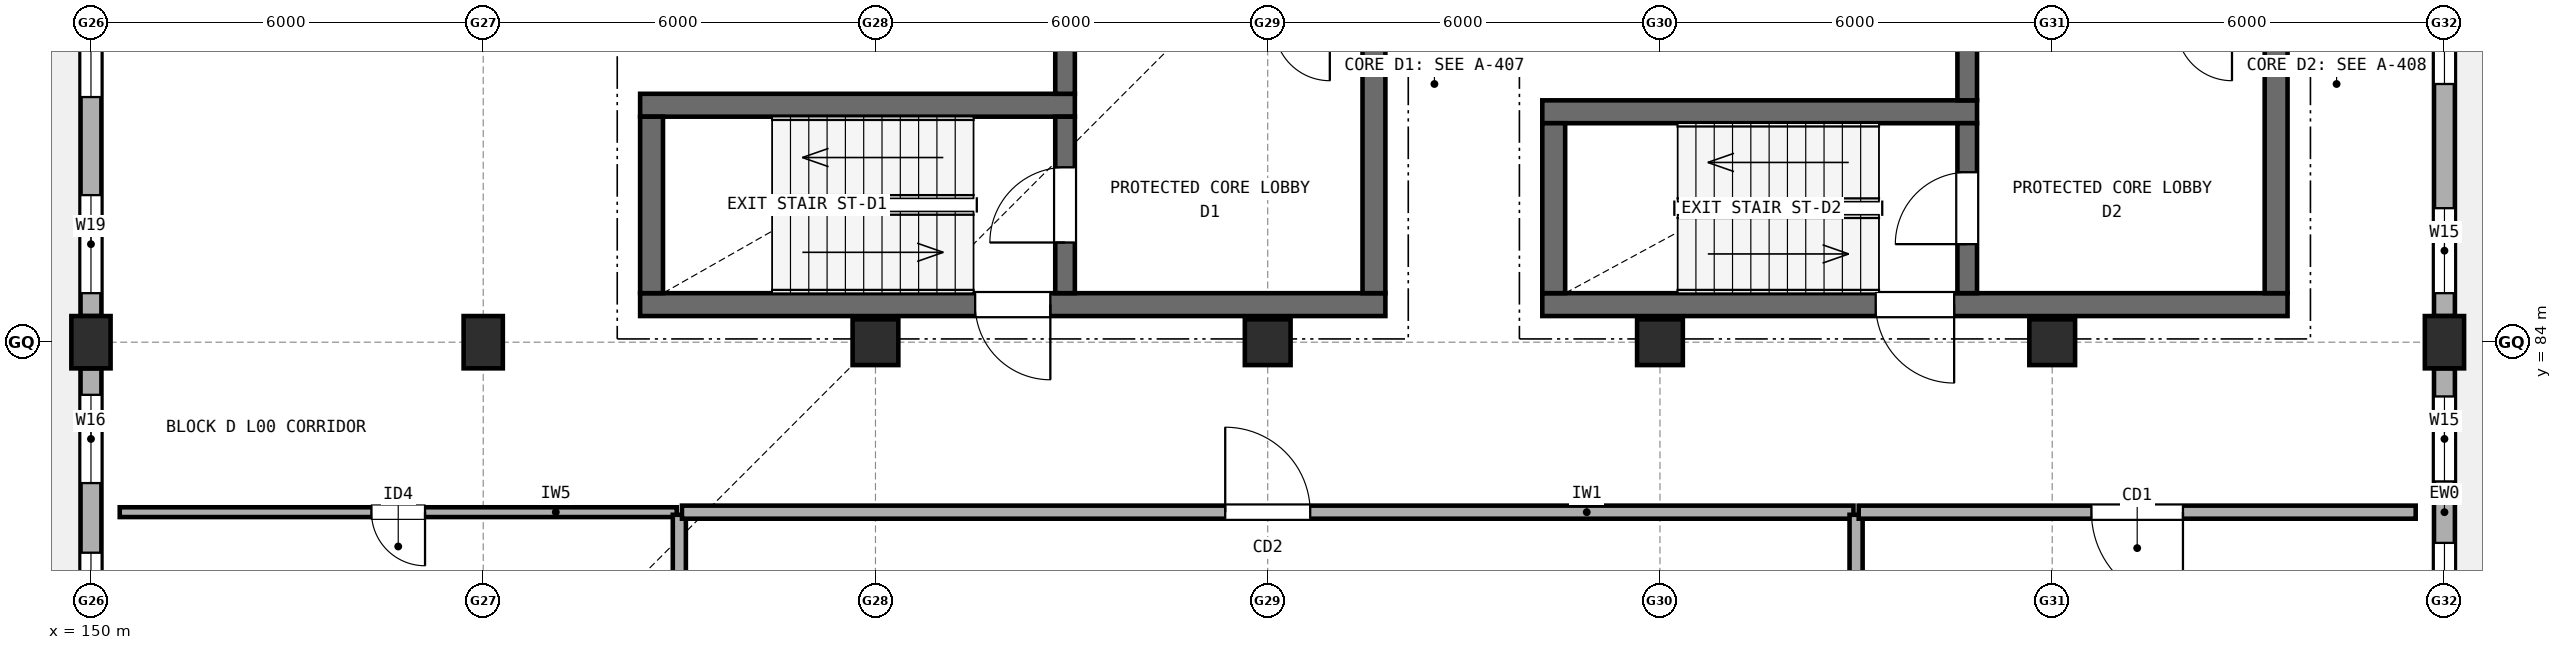
"""IFC4 building model, lengths in metres.
Left out: names, types, materials, properties, quantities, classifications, styles, units other than length and angle.
Written with IfcOpenShell. Run it as: python <this file> out.ifc"""

import sys

from ifc_helpers import new_model, si_unit, direction, frame, frame_2d, origin, origin_2d, place, context, subcontext, project, spatial, rectangle, extrude, element, fill, save


model = new_model("IFC4")
c1 = context("Model", 3, precision=1e-05, world=origin(), true_north=direction((0.0, 1.0)))
c2 = subcontext(c1, "Body", "Model", "MODEL_VIEW")
j1 = project(units=[si_unit("LENGTHUNIT", "METRE"), si_unit("PLANEANGLEUNIT", "RADIAN")], contexts=[c1])
p1 = place(None, origin())
s1 = spatial("IfcSite", under=j1, at=p1, CompositionType="ELEMENT")
p2 = place(p1, origin())
s2 = spatial("IfcBuilding", under=s1, at=p2, CompositionType="ELEMENT")
p3 = place(p2, origin())
s3 = spatial("IfcBuildingStorey", under=s2, at=p3, CompositionType="ELEMENT", Elevation=0.0)
for number, where, z_axis, x_axis in (
    (1, (150.0, 84.0, 0.0), (0.0, 0.0, 1.0), (1.0, 0.0, 0.0)),
    (2, (156.0, 84.0, 0.0), (0.0, 0.0, 1.0), (1.0, 0.0, 0.0)),
):
    element("IfcColumn", number, at=place(p3, frame(where, z_axis=z_axis, x_axis=x_axis)), inside=s3, PredefinedType="COLUMN", context=c2, shape_type="SweptSolid", body=[
        extrude(rectangle(XDim=0.6, YDim=0.8, at=origin_2d()), origin(), (0.0, 0.0, 1.0), 4.23),
    ])
for number, where, z_axis, x_axis in (
    (3, (162.0, 84.0, 0.0), (0.0, 0.0, 1.0), (1.0, 0.0, 0.0)),
    (4, (168.0, 84.0, 0.0), (0.0, 0.0, 1.0), (1.0, 0.0, 0.0)),
    (5, (174.0, 84.0, 0.0), (0.0, 0.0, 1.0), (1.0, 0.0, 0.0)),
    (6, (180.0, 84.0, 0.0), (0.0, 0.0, 1.0), (1.0, 0.0, 0.0)),
):
    element("IfcColumn", number, at=place(p3, frame(where, z_axis=z_axis, x_axis=x_axis)), inside=s3, PredefinedType="COLUMN", context=c2, shape_type="SweptSolid", body=[
        extrude(rectangle(XDim=0.7, YDim=0.7, at=origin_2d()), origin(), (0.0, 0.0, 1.0), 4.23),
    ])
p4 = place(p3, frame((186.0, 84.0, 0.0), z_axis=(0.0, 0.0, 1.0), x_axis=(1.0, 0.0, 0.0)))
e7 = element("IfcColumn", 7, at=p4, inside=s3, PredefinedType="COLUMN", context=c2, shape_type="SweptSolid", body=[
    extrude(rectangle(XDim=0.6, YDim=0.8, at=origin_2d()), origin(), (0.0, 0.0, 1.0), 4.23),
])
p5 = place(p3, frame((186.0, 78.4, 0.0), z_axis=(0.0, 0.0, 1.0), x_axis=(0.0, 1.0, 0.0)))
e8 = element("IfcWall", 8, at=p5, inside=s3, PredefinedType="STANDARD", context=c2, shape_type="SweptSolid", body=[
    extrude(rectangle(XDim=5.2, YDim=0.32, at=frame_2d((2.6, 0.0))), origin(), (0.0, 0.0, 1.0), 3.712),
])
p6 = place(p5, frame((0.43, 0.0, 0.9)))
e9 = element("IfcOpeningElement", 9, at=p6, cuts=e8, PredefinedType="OPENING", context=c2, shape_type="SweptSolid", body=[
    extrude(rectangle(XDim=2.1, YDim=1.55, at=frame_2d((1.05, 0.775))), frame((0.0, 0.17, 0.0), z_axis=(0.0, -1.0, 0.0), x_axis=(1.0, 0.0, 0.0)), (0.0, 0.0, 1.0), 0.34),
])
p7 = place(p5, frame((3.47, 0.0, 0.9)))
e10 = element("IfcOpeningElement", 10, at=p7, cuts=e8, PredefinedType="OPENING", context=c2, shape_type="SweptSolid", body=[
    extrude(rectangle(XDim=1.3, YDim=1.45, at=frame_2d((0.65, 0.725))), frame((0.0, 0.17, 0.0), z_axis=(0.0, -1.0, 0.0), x_axis=(1.0, 0.0, 0.0)), (0.0, 0.0, 1.0), 0.34),
])
p8 = place(p3, frame((186.0, 84.4, 0.0), z_axis=(0.0, 0.0, 1.0), x_axis=(0.0, 1.0, 0.0)))
e11 = element("IfcWall", 11, at=p8, inside=s3, PredefinedType="STANDARD", context=c2, shape_type="SweptSolid", body=[
    extrude(rectangle(XDim=5.2, YDim=0.32, at=frame_2d((2.6, 0.0))), origin(), (0.0, 0.0, 1.0), 3.712),
])
p9 = place(p8, frame((0.35, 0.0, 0.9)))
e12 = element("IfcOpeningElement", 12, at=p9, cuts=e11, PredefinedType="OPENING", context=c2, shape_type="SweptSolid", body=[
    extrude(rectangle(XDim=1.3, YDim=1.45, at=frame_2d((0.65, 0.725))), frame((0.0, 0.17, 0.0), z_axis=(0.0, -1.0, 0.0), x_axis=(1.0, 0.0, 0.0)), (0.0, 0.0, 1.0), 0.34),
])
p10 = place(p8, frame((3.55, 0.0, 0.9)))
e13 = element("IfcOpeningElement", 13, at=p10, cuts=e11, PredefinedType="OPENING", context=c2, shape_type="SweptSolid", body=[
    extrude(rectangle(XDim=1.3, YDim=1.45, at=frame_2d((0.65, 0.725))), frame((0.0, 0.17, 0.0), z_axis=(0.0, -1.0, 0.0), x_axis=(1.0, 0.0, 0.0)), (0.0, 0.0, 1.0), 0.34),
])
p11 = place(p3, frame((150.0, 89.6, 0.0), z_axis=(0.0, 0.0, 1.0), x_axis=(0.0, -1.0, 0.0)))
e14 = element("IfcWall", 14, at=p11, inside=s3, PredefinedType="STANDARD", context=c2, shape_type="SweptSolid", body=[
    extrude(rectangle(XDim=5.2, YDim=0.32, at=frame_2d((2.6, 0.0))), origin(), (0.0, 0.0, 1.0), 3.712),
])
p12 = place(p11, frame((0.35, 0.0, 0.9)))
e15 = element("IfcOpeningElement", 15, at=p12, cuts=e14, PredefinedType="OPENING", context=c2, shape_type="SweptSolid", body=[
    extrude(rectangle(XDim=1.5, YDim=1.5, at=frame_2d((0.75, 0.75))), frame((0.0, 0.17, 0.0), z_axis=(0.0, -1.0, 0.0), x_axis=(1.0, 0.0, 0.0)), (0.0, 0.0, 1.0), 0.34),
])
p13 = place(p11, frame((3.35, 0.0, 0.9)))
e16 = element("IfcOpeningElement", 16, at=p13, cuts=e14, PredefinedType="OPENING", context=c2, shape_type="SweptSolid", body=[
    extrude(rectangle(XDim=1.5, YDim=1.5, at=frame_2d((0.75, 0.75))), frame((0.0, 0.17, 0.0), z_axis=(0.0, -1.0, 0.0), x_axis=(1.0, 0.0, 0.0)), (0.0, 0.0, 1.0), 0.34),
])
p14 = place(p3, frame((150.0, 83.6, 0.0), z_axis=(0.0, 0.0, 1.0), x_axis=(0.0, -1.0, 0.0)))
e17 = element("IfcWall", 17, at=p14, inside=s3, PredefinedType="STANDARD", context=c2, shape_type="SweptSolid", body=[
    extrude(rectangle(XDim=5.2, YDim=0.32, at=frame_2d((2.6, 0.0))), origin(), (0.0, 0.0, 1.0), 3.712),
])
p15 = place(p14, frame((0.405, 0.0, 0.9)))
e18 = element("IfcOpeningElement", 18, at=p15, cuts=e17, PredefinedType="OPENING", context=c2, shape_type="SweptSolid", body=[
    extrude(rectangle(XDim=1.35, YDim=1.5, at=frame_2d((0.675, 0.75))), frame((0.0, 0.17, 0.0), z_axis=(0.0, -1.0, 0.0), x_axis=(1.0, 0.0, 0.0)), (0.0, 0.0, 1.0), 0.34),
])
p16 = place(p14, frame((2.82, 0.0, 0.9)))
e19 = element("IfcOpeningElement", 19, at=p16, cuts=e17, PredefinedType="OPENING", context=c2, shape_type="SweptSolid", body=[
    extrude(rectangle(XDim=1.8, YDim=1.45, at=frame_2d((0.9, 0.725))), frame((0.0, 0.17, 0.0), z_axis=(0.0, -1.0, 0.0), x_axis=(1.0, 0.0, 0.0)), (0.0, 0.0, 1.0), 0.34),
])
p17 = place(p3, frame((158.4, 84.575, 0.0), z_axis=(0.0, 0.0, 1.0), x_axis=(1.0, 0.0, 0.0)))
e20 = element("IfcWall", 20, at=p17, inside=s3, PredefinedType="SHEAR", context=c2, shape_type="SweptSolid", body=[
    extrude(rectangle(XDim=11.4, YDim=0.35, at=frame_2d((5.7, 0.0))), origin(), (0.0, 0.0, 1.0), 4.23),
])
p18 = place(p17, frame((5.125, 0.0, 0.0)))
e21 = element("IfcOpeningElement", 21, at=p18, cuts=e20, PredefinedType="OPENING", context=c2, shape_type="SweptSolid", body=[
    extrude(rectangle(XDim=1.15, YDim=2.15, at=frame_2d((0.575, 1.075))), frame((0.0, 0.185, 0.0), z_axis=(0.0, -1.0, 0.0), x_axis=(1.0, 0.0, 0.0)), (0.0, 0.0, 1.0), 0.37),
])
p19 = place(p3, frame((165.05, 87.625, 0.0), z_axis=(0.0, 0.0, 1.0), x_axis=(-1.0, 0.0, 0.0)))
e22 = element("IfcWall", 22, at=p19, inside=s3, PredefinedType="SHEAR", context=c2, shape_type="SweptSolid", body=[
    extrude(rectangle(XDim=6.65, YDim=0.35, at=frame_2d((3.325, 0.0))), origin(), (0.0, 0.0, 1.0), 4.23),
])
p20 = place(p3, frame((158.575, 87.45, 0.0), z_axis=(0.0, 0.0, 1.0), x_axis=(0.0, -1.0, 0.0)))
e23 = element("IfcWall", 23, at=p20, inside=s3, PredefinedType="SHEAR", context=c2, shape_type="SweptSolid", body=[
    extrude(rectangle(XDim=2.7, YDim=0.35, at=frame_2d((1.35, 0.0))), origin(), (0.0, 0.0, 1.0), 4.23),
])
p21 = place(p3, frame((164.9, 84.75, 0.0), z_axis=(0.0, 0.0, 1.0), x_axis=(0.0, 1.0, 0.0)))
e24 = element("IfcWall", 24, at=p21, inside=s3, PredefinedType="SHEAR", context=c2, shape_type="SweptSolid", body=[
    extrude(rectangle(XDim=2.7, YDim=0.3, at=frame_2d((1.35, 0.0))), origin(), (0.0, 0.0, 1.0), 4.23),
])
p22 = place(p21, frame((0.775, 0.0, 0.0)))
e25 = element("IfcOpeningElement", 25, at=p22, cuts=e24, PredefinedType="OPENING", context=c2, shape_type="SweptSolid", body=[
    extrude(rectangle(XDim=1.15, YDim=2.15, at=frame_2d((0.575, 1.075))), frame((0.0, 0.16, 0.0), z_axis=(0.0, -1.0, 0.0), x_axis=(1.0, 0.0, 0.0)), (0.0, 0.0, 1.0), 0.32),
])
p23 = place(p3, frame((169.625, 84.75, 0.0), z_axis=(0.0, 0.0, 1.0), x_axis=(0.0, 1.0, 0.0)))
e26 = element("IfcWall", 26, at=p23, inside=s3, PredefinedType="SHEAR", context=c2, shape_type="SweptSolid", body=[
    extrude(rectangle(XDim=6.4, YDim=0.35, at=frame_2d((3.2, 0.0))), origin(), (0.0, 0.0, 1.0), 4.23),
])
p24 = place(p3, frame((164.9, 87.8, 0.0), z_axis=(0.0, 0.0, 1.0), x_axis=(0.0, 1.0, 0.0)))
e27 = element("IfcWall", 27, at=p24, inside=s3, PredefinedType="SHEAR", context=c2, shape_type="SweptSolid", body=[
    extrude(rectangle(XDim=3.35, YDim=0.3, at=frame_2d((1.675, 0.0))), origin(), (0.0, 0.0, 1.0), 4.23),
])
p25 = place(p3, frame((172.2, 84.575, 0.0), z_axis=(0.0, 0.0, 1.0), x_axis=(1.0, 0.0, 0.0)))
e28 = element("IfcWall", 28, at=p25, inside=s3, PredefinedType="SHEAR", context=c2, shape_type="SweptSolid", body=[
    extrude(rectangle(XDim=11.4, YDim=0.35, at=frame_2d((5.7, 0.0))), origin(), (0.0, 0.0, 1.0), 4.23),
])
p26 = place(p25, frame((5.1, 0.0, 0.0)))
e29 = element("IfcOpeningElement", 29, at=p26, cuts=e28, PredefinedType="OPENING", context=c2, shape_type="SweptSolid", body=[
    extrude(rectangle(XDim=1.2, YDim=2.15, at=frame_2d((0.6, 1.075))), frame((0.0, 0.185, 0.0), z_axis=(0.0, -1.0, 0.0), x_axis=(1.0, 0.0, 0.0)), (0.0, 0.0, 1.0), 0.37),
])
p27 = place(p3, frame((178.85, 87.525, 0.0), z_axis=(0.0, 0.0, 1.0), x_axis=(-1.0, 0.0, 0.0)))
e30 = element("IfcWall", 30, at=p27, inside=s3, PredefinedType="SHEAR", context=c2, shape_type="SweptSolid", body=[
    extrude(rectangle(XDim=6.65, YDim=0.35, at=frame_2d((3.325, 0.0))), origin(), (0.0, 0.0, 1.0), 4.23),
])
p28 = place(p3, frame((172.375, 87.35, 0.0), z_axis=(0.0, 0.0, 1.0), x_axis=(0.0, -1.0, 0.0)))
e31 = element("IfcWall", 31, at=p28, inside=s3, PredefinedType="SHEAR", context=c2, shape_type="SweptSolid", body=[
    extrude(rectangle(XDim=2.6, YDim=0.35, at=frame_2d((1.3, 0.0))), origin(), (0.0, 0.0, 1.0), 4.23),
])
p29 = place(p3, frame((178.7, 84.75, 0.0), z_axis=(0.0, 0.0, 1.0), x_axis=(0.0, 1.0, 0.0)))
e32 = element("IfcWall", 32, at=p29, inside=s3, PredefinedType="SHEAR", context=c2, shape_type="SweptSolid", body=[
    extrude(rectangle(XDim=2.6, YDim=0.3, at=frame_2d((1.3, 0.0))), origin(), (0.0, 0.0, 1.0), 4.23),
])
p30 = place(p29, frame((0.75, 0.0, 0.0)))
e33 = element("IfcOpeningElement", 33, at=p30, cuts=e32, PredefinedType="OPENING", context=c2, shape_type="SweptSolid", body=[
    extrude(rectangle(XDim=1.1, YDim=2.15, at=frame_2d((0.55, 1.075))), frame((0.0, 0.16, 0.0), z_axis=(0.0, -1.0, 0.0), x_axis=(1.0, 0.0, 0.0)), (0.0, 0.0, 1.0), 0.32),
])
p31 = place(p3, frame((183.425, 84.75, 0.0), z_axis=(0.0, 0.0, 1.0), x_axis=(0.0, 1.0, 0.0)))
e34 = element("IfcWall", 34, at=p31, inside=s3, PredefinedType="SHEAR", context=c2, shape_type="SweptSolid", body=[
    extrude(rectangle(XDim=6.4, YDim=0.35, at=frame_2d((3.2, 0.0))), origin(), (0.0, 0.0, 1.0), 4.23),
])
p32 = place(p3, frame((178.7, 87.7, 0.0), z_axis=(0.0, 0.0, 1.0), x_axis=(0.0, 1.0, 0.0)))
e35 = element("IfcWall", 35, at=p32, inside=s3, PredefinedType="SHEAR", context=c2, shape_type="SweptSolid", body=[
    extrude(rectangle(XDim=3.45, YDim=0.3, at=frame_2d((1.725, 0.0))), origin(), (0.0, 0.0, 1.0), 4.23),
])
p33 = place(p3, frame((150.44, 81.4, 0.0), z_axis=(0.0, 0.0, 1.0), x_axis=(1.0, 0.0, 0.0)))
e36 = element("IfcWall", 36, at=p33, inside=s3, PredefinedType="PARTITIONING", context=c2, shape_type="SweptSolid", body=[
    extrude(rectangle(XDim=8.52, YDim=0.15, at=frame_2d((4.26, 0.0))), origin(), (0.0, 0.0, 1.0), 3.712),
])
p34 = place(p33, frame((3.85, 0.0, 0.0)))
e37 = element("IfcOpeningElement", 37, at=p34, cuts=e36, PredefinedType="OPENING", context=c2, shape_type="SweptSolid", body=[
    extrude(rectangle(XDim=0.82, YDim=2.08, at=frame_2d((0.41, 1.04))), frame((0.0, 0.085, 0.0), z_axis=(0.0, -1.0, 0.0), x_axis=(1.0, 0.0, 0.0)), (0.0, 0.0, 1.0), 0.17),
])
p35 = place(p3, frame((159.0, 72.44, 0.0), z_axis=(0.0, 0.0, 1.0), x_axis=(0.0, 1.0, 0.0)))
e38 = element("IfcWall", 38, at=p35, inside=s3, PredefinedType="SOLIDWALL", context=c2, shape_type="SweptSolid", body=[
    extrude(rectangle(XDim=8.92, YDim=0.2, at=frame_2d((4.46, 0.0))), origin(), (0.0, 0.0, 1.0), 3.112),
])
p36 = place(p3, frame((159.04, 81.4, 0.0), z_axis=(0.0, 0.0, 1.0), x_axis=(1.0, 0.0, 0.0)))
e39 = element("IfcWall", 39, at=p36, inside=s3, PredefinedType="SOLIDWALL", context=c2, shape_type="SweptSolid", body=[
    extrude(rectangle(XDim=17.92, YDim=0.2, at=frame_2d((8.96, 0.0))), origin(), (0.0, 0.0, 1.0), 3.612),
])
p37 = place(p36, frame((8.31, 0.0, 0.0)))
e40 = element("IfcOpeningElement", 40, at=p37, cuts=e39, PredefinedType="OPENING", context=c2, shape_type="SweptSolid", body=[
    extrude(rectangle(XDim=1.3, YDim=2.15, at=frame_2d((0.65, 1.075))), frame((0.0, 0.11, 0.0), z_axis=(0.0, -1.0, 0.0), x_axis=(1.0, 0.0, 0.0)), (0.0, 0.0, 1.0), 0.22),
])
p38 = place(p3, frame((177.0, 72.44, 0.0), z_axis=(0.0, 0.0, 1.0), x_axis=(0.0, 1.0, 0.0)))
e41 = element("IfcWall", 41, at=p38, inside=s3, PredefinedType="SOLIDWALL", context=c2, shape_type="SweptSolid", body=[
    extrude(rectangle(XDim=8.92, YDim=0.2, at=frame_2d((4.46, 0.0))), origin(), (0.0, 0.0, 1.0), 3.112),
])
p39 = place(p3, frame((177.04, 81.4, 0.0), z_axis=(0.0, 0.0, 1.0), x_axis=(1.0, 0.0, 0.0)))
e42 = element("IfcWall", 42, at=p39, inside=s3, PredefinedType="SOLIDWALL", context=c2, shape_type="SweptSolid", body=[
    extrude(rectangle(XDim=8.52, YDim=0.2, at=frame_2d((4.26, 0.0))), origin(), (0.0, 0.0, 1.0), 3.612),
])
p40 = place(p39, frame((3.56, 0.0, 0.0)))
e43 = element("IfcOpeningElement", 43, at=p40, cuts=e42, PredefinedType="OPENING", context=c2, shape_type="SweptSolid", body=[
    extrude(rectangle(XDim=1.4, YDim=2.15, at=frame_2d((0.7, 1.075))), frame((0.0, 0.11, 0.0), z_axis=(0.0, -1.0, 0.0), x_axis=(1.0, 0.0, 0.0)), (0.0, 0.0, 1.0), 0.22),
])
p41 = place(p6, origin())
e44 = element("IfcWindow", 44, at=p41, inside=s3, PartitioningType="SINGLE_PANEL", PredefinedType="WINDOW", context=c2, shape_type="SweptSolid", body=[
    extrude(rectangle(XDim=2.1, YDim=1.55, at=frame_2d((1.05, 0.775))), frame((0.0, 0.03, 0.0), z_axis=(0.0, -1.0, 0.0), x_axis=(1.0, 0.0, 0.0)), (0.0, 0.0, 1.0), 0.06),
])
fill(e9, e44)
p42 = place(p7, origin())
e45 = element("IfcWindow", 45, at=p42, inside=s3, PartitioningType="SINGLE_PANEL", PredefinedType="WINDOW", context=c2, shape_type="SweptSolid", body=[
    extrude(rectangle(XDim=1.3, YDim=1.45, at=frame_2d((0.65, 0.725))), frame((0.0, 0.03, 0.0), z_axis=(0.0, -1.0, 0.0), x_axis=(1.0, 0.0, 0.0)), (0.0, 0.0, 1.0), 0.06),
])
fill(e10, e45)
p43 = place(p9, origin())
e46 = element("IfcWindow", 46, at=p43, inside=s3, PartitioningType="SINGLE_PANEL", PredefinedType="WINDOW", context=c2, shape_type="SweptSolid", body=[
    extrude(rectangle(XDim=1.3, YDim=1.45, at=frame_2d((0.65, 0.725))), frame((0.0, 0.03, 0.0), z_axis=(0.0, -1.0, 0.0), x_axis=(1.0, 0.0, 0.0)), (0.0, 0.0, 1.0), 0.06),
])
fill(e12, e46)
p44 = place(p10, origin())
e47 = element("IfcWindow", 47, at=p44, inside=s3, PartitioningType="SINGLE_PANEL", PredefinedType="WINDOW", context=c2, shape_type="SweptSolid", body=[
    extrude(rectangle(XDim=1.3, YDim=1.45, at=frame_2d((0.65, 0.725))), frame((0.0, 0.03, 0.0), z_axis=(0.0, -1.0, 0.0), x_axis=(1.0, 0.0, 0.0)), (0.0, 0.0, 1.0), 0.06),
])
fill(e13, e47)
p45 = place(p12, origin())
e48 = element("IfcWindow", 48, at=p45, inside=s3, PartitioningType="SINGLE_PANEL", PredefinedType="WINDOW", context=c2, shape_type="SweptSolid", body=[
    extrude(rectangle(XDim=1.5, YDim=1.5, at=frame_2d((0.75, 0.75))), frame((0.0, 0.03, 0.0), z_axis=(0.0, -1.0, 0.0), x_axis=(1.0, 0.0, 0.0)), (0.0, 0.0, 1.0), 0.06),
])
fill(e15, e48)
p46 = place(p13, origin())
e49 = element("IfcWindow", 49, at=p46, inside=s3, PartitioningType="SINGLE_PANEL", PredefinedType="WINDOW", context=c2, shape_type="SweptSolid", body=[
    extrude(rectangle(XDim=1.5, YDim=1.5, at=frame_2d((0.75, 0.75))), frame((0.0, 0.03, 0.0), z_axis=(0.0, -1.0, 0.0), x_axis=(1.0, 0.0, 0.0)), (0.0, 0.0, 1.0), 0.06),
])
fill(e16, e49)
p47 = place(p15, origin())
e50 = element("IfcWindow", 50, at=p47, inside=s3, PartitioningType="SINGLE_PANEL", PredefinedType="WINDOW", context=c2, shape_type="SweptSolid", body=[
    extrude(rectangle(XDim=1.35, YDim=1.5, at=frame_2d((0.675, 0.75))), frame((0.0, 0.03, 0.0), z_axis=(0.0, -1.0, 0.0), x_axis=(1.0, 0.0, 0.0)), (0.0, 0.0, 1.0), 0.06),
])
fill(e18, e50)
p48 = place(p16, origin())
e51 = element("IfcWindow", 51, at=p48, inside=s3, PartitioningType="SINGLE_PANEL", PredefinedType="WINDOW", context=c2, shape_type="SweptSolid", body=[
    extrude(rectangle(XDim=1.8, YDim=1.45, at=frame_2d((0.9, 0.725))), frame((0.0, 0.03, 0.0), z_axis=(0.0, -1.0, 0.0), x_axis=(1.0, 0.0, 0.0)), (0.0, 0.0, 1.0), 0.06),
])
fill(e19, e51)
p49 = place(p18, origin())
e52 = element("IfcDoor", 52, at=p49, inside=s3, OperationType="SINGLE_SWING_RIGHT", PredefinedType="DOOR", context=c2, shape_type="SweptSolid", body=[
    extrude(rectangle(XDim=1.15, YDim=2.15, at=frame_2d((0.575, 1.075))), frame((0.0, 0.025, 0.0), z_axis=(0.0, -1.0, 0.0), x_axis=(1.0, 0.0, 0.0)), (0.0, 0.0, 1.0), 0.05),
])
fill(e21, e52)
p50 = place(p22, origin())
e53 = element("IfcDoor", 53, at=p50, inside=s3, OperationType="SINGLE_SWING_LEFT", PredefinedType="DOOR", context=c2, shape_type="SweptSolid", body=[
    extrude(rectangle(XDim=1.15, YDim=2.15, at=frame_2d((0.575, 1.075))), frame((0.0, 0.025, 0.0), z_axis=(0.0, -1.0, 0.0), x_axis=(1.0, 0.0, 0.0)), (0.0, 0.0, 1.0), 0.05),
])
fill(e25, e53)
p51 = place(p26, origin())
e54 = element("IfcDoor", 54, at=p51, inside=s3, OperationType="SINGLE_SWING_RIGHT", PredefinedType="DOOR", context=c2, shape_type="SweptSolid", body=[
    extrude(rectangle(XDim=1.2, YDim=2.15, at=frame_2d((0.6, 1.075))), frame((0.0, 0.025, 0.0), z_axis=(0.0, -1.0, 0.0), x_axis=(1.0, 0.0, 0.0)), (0.0, 0.0, 1.0), 0.05),
])
fill(e29, e54)
p52 = place(p30, origin())
e55 = element("IfcDoor", 55, at=p52, inside=s3, OperationType="SINGLE_SWING_LEFT", PredefinedType="DOOR", context=c2, shape_type="SweptSolid", body=[
    extrude(rectangle(XDim=1.1, YDim=2.15, at=frame_2d((0.55, 1.075))), frame((0.0, 0.025, 0.0), z_axis=(0.0, -1.0, 0.0), x_axis=(1.0, 0.0, 0.0)), (0.0, 0.0, 1.0), 0.05),
])
fill(e33, e55)
p53 = place(p34, origin())
e56 = element("IfcDoor", 56, at=p53, inside=s3, OperationType="SINGLE_SWING_RIGHT", PredefinedType="DOOR", context=c2, shape_type="SweptSolid", body=[
    extrude(rectangle(XDim=0.82, YDim=2.08, at=frame_2d((0.41, 1.04))), frame((0.0, 0.025, 0.0), z_axis=(0.0, -1.0, 0.0), x_axis=(1.0, 0.0, 0.0)), (0.0, 0.0, 1.0), 0.05),
])
fill(e37, e56)
p54 = place(p37, origin())
e57 = element("IfcDoor", 57, at=p54, inside=s3, OperationType="SINGLE_SWING_LEFT", PredefinedType="DOOR", context=c2, shape_type="SweptSolid", body=[
    extrude(rectangle(XDim=1.3, YDim=2.15, at=frame_2d((0.65, 1.075))), frame((0.0, 0.025, 0.0), z_axis=(0.0, -1.0, 0.0), x_axis=(1.0, 0.0, 0.0)), (0.0, 0.0, 1.0), 0.05),
])
fill(e40, e57)
p55 = place(p40, origin())
e58 = element("IfcDoor", 58, at=p55, inside=s3, OperationType="SINGLE_SWING_RIGHT", PredefinedType="DOOR", context=c2, shape_type="SweptSolid", body=[
    extrude(rectangle(XDim=1.4, YDim=2.15, at=frame_2d((0.7, 1.075))), frame((0.0, 0.025, 0.0), z_axis=(0.0, -1.0, 0.0), x_axis=(1.0, 0.0, 0.0)), (0.0, 0.0, 1.0), 0.05),
])
fill(e43, e58)
save(model, sys.argv[1])
